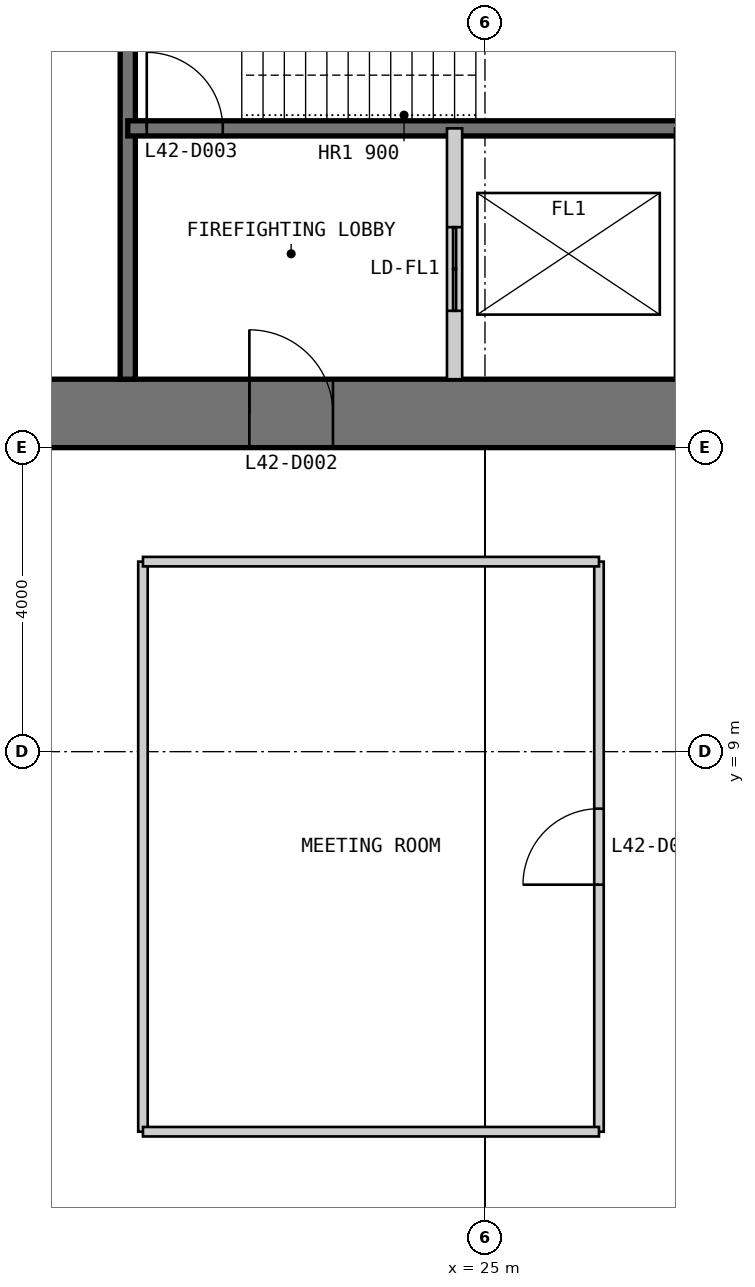
"""IFC4 building model, lengths in metres.
Left out: names, types, materials, properties, quantities, classifications, styles, units other than length and angle.
Written with IfcOpenShell. Run it as: python <this file> out.ifc"""

import sys

from ifc_helpers import new_model, si_unit, direction, frame, frame_2d, origin, place, context, subcontext, project, spatial, polyline, rectangle, outline, extrude, element, fill, save


model = new_model("IFC4")
c1 = context("Model", 3, precision=1e-05, world=origin(), true_north=direction((0.0, 1.0)))
c2 = subcontext(c1, "Body", "Model", "MODEL_VIEW")
j1 = project(units=[si_unit("LENGTHUNIT", "METRE"), si_unit("PLANEANGLEUNIT", "RADIAN")], contexts=[c1])
p1 = place(None, origin())
s1 = spatial("IfcSite", under=j1, at=p1, CompositionType="ELEMENT")
p2 = place(p1, origin())
s2 = spatial("IfcBuilding", under=s1, at=p2, CompositionType="ELEMENT")
p3 = place(p2, frame((0.0, 0.0, 181.8)))
s3 = spatial("IfcBuildingStorey", under=s2, at=p3, CompositionType="ELEMENT", Elevation=181.8)
p4 = place(p3, frame((13.0, 13.45, 0.0), z_axis=(0.0, 0.0, 1.0), x_axis=(1.0, 0.0, 0.0)))
e1 = element("IfcWall", 1, at=p4, inside=s3, PredefinedType="SHEAR", context=c2, shape_type="SweptSolid", body=[
    extrude(outline(polyline([(0.0, -0.45), (24.0, -0.45), (23.1, 0.45), (0.9, 0.45), (0.0, -0.45)])), origin(), (0.0, 0.0, 1.0), 4.0),
])
p5 = place(p4, frame((4.9, 0.0, 0.0)))
e2 = element("IfcOpeningElement", 2, at=p5, cuts=e1, PredefinedType="OPENING", context=c2, shape_type="SweptSolid", body=[
    extrude(rectangle(XDim=1.0, YDim=2.2, at=frame_2d((0.5, 1.1))), frame((0.0, 0.46, 0.0), z_axis=(0.0, -1.0, 0.0), x_axis=(1.0, 0.0, 0.0)), (0.0, 0.0, 1.0), 0.92),
])
p6 = place(p4, frame((8.9, 0.0, 0.0)))
e3 = element("IfcOpeningElement", 3, at=p6, cuts=e1, PredefinedType="OPENING", context=c2, shape_type="SweptSolid", body=[
    extrude(rectangle(XDim=1.1, YDim=2.2, at=frame_2d((0.55, 1.1))), frame((0.0, 0.46, 0.0), z_axis=(0.0, -1.0, 0.0), x_axis=(1.0, 0.0, 0.0)), (0.0, 0.0, 1.0), 0.92),
])
p7 = place(p4, frame((15.05, 0.0, 0.0)))
e4 = element("IfcOpeningElement", 4, at=p7, cuts=e1, PredefinedType="OPENING", context=c2, shape_type="SweptSolid", body=[
    extrude(rectangle(XDim=0.9, YDim=2.2, at=frame_2d((0.45, 1.1))), frame((0.0, 0.46, 0.0), z_axis=(0.0, -1.0, 0.0), x_axis=(1.0, 0.0, 0.0)), (0.0, 0.0, 1.0), 0.92),
])
p8 = place(p4, frame((17.9, 0.0, 0.0)))
e5 = element("IfcOpeningElement", 5, at=p8, cuts=e1, PredefinedType="OPENING", context=c2, shape_type="SweptSolid", body=[
    extrude(rectangle(XDim=1.0, YDim=2.2, at=frame_2d((0.5, 1.1))), frame((0.0, 0.46, 0.0), z_axis=(0.0, -1.0, 0.0), x_axis=(1.0, 0.0, 0.0)), (0.0, 0.0, 1.0), 0.92),
])
p9 = place(p4, frame((21.4, 0.0, 0.0)))
e6 = element("IfcOpeningElement", 6, at=p9, cuts=e1, PredefinedType="OPENING", context=c2, shape_type="SweptSolid", body=[
    extrude(rectangle(XDim=1.0, YDim=2.2, at=frame_2d((0.5, 1.1))), frame((0.0, 0.46, 0.0), z_axis=(0.0, -1.0, 0.0), x_axis=(1.0, 0.0, 0.0)), (0.0, 0.0, 1.0), 0.92),
])
p10 = place(p3, frame((20.3, 13.9, 0.0), z_axis=(0.0, 0.0, 1.0), x_axis=(0.0, 1.0, 0.0)))
e7 = element("IfcWall", 7, at=p10, inside=s3, PredefinedType="SOLIDWALL", context=c2, shape_type="SweptSolid", body=[
    extrude(rectangle(XDim=16.1, YDim=0.2, at=frame_2d((8.05, 0.0))), origin(), (0.0, 0.0, 1.0), 3.8),
])
p11 = place(p10, frame((6.65, 0.0, 0.0)))
e8 = element("IfcOpeningElement", 8, at=p11, cuts=e7, PredefinedType="OPENING", context=c2, shape_type="SweptSolid", body=[
    extrude(rectangle(XDim=0.9, YDim=2.2, at=frame_2d((0.45, 1.1))), frame((0.0, 0.11, 0.0), z_axis=(0.0, -1.0, 0.0), x_axis=(1.0, 0.0, 0.0)), (0.0, 0.0, 1.0), 0.22),
])
p12 = place(p10, frame((9.35, 0.0, 0.0)))
e9 = element("IfcOpeningElement", 9, at=p12, cuts=e7, PredefinedType="OPENING", context=c2, shape_type="SweptSolid", body=[
    extrude(rectangle(XDim=0.9, YDim=2.2, at=frame_2d((0.45, 1.1))), frame((0.0, 0.11, 0.0), z_axis=(0.0, -1.0, 0.0), x_axis=(1.0, 0.0, 0.0)), (0.0, 0.0, 1.0), 0.22),
])
p13 = place(p10, frame((13.35, 0.0, 0.0)))
e10 = element("IfcOpeningElement", 10, at=p13, cuts=e7, PredefinedType="OPENING", context=c2, shape_type="SweptSolid", body=[
    extrude(rectangle(XDim=0.9, YDim=2.2, at=frame_2d((0.45, 1.1))), frame((0.0, 0.11, 0.0), z_axis=(0.0, -1.0, 0.0), x_axis=(1.0, 0.0, 0.0)), (0.0, 0.0, 1.0), 0.22),
])
p14 = place(p3, frame((20.3, 17.2, 0.0), z_axis=(0.0, 0.0, 1.0), x_axis=(1.0, 0.0, 0.0)))
e11 = element("IfcWall", 11, at=p14, inside=s3, PredefinedType="SOLIDWALL", context=c2, shape_type="SweptSolid", body=[
    extrude(rectangle(XDim=9.4, YDim=0.2, at=frame_2d((4.7, 0.0))), origin(), (0.0, 0.0, 1.0), 3.8),
])
p15 = place(p14, frame((0.25, 0.0, 0.0)))
e12 = element("IfcOpeningElement", 12, at=p15, cuts=e11, PredefinedType="OPENING", context=c2, shape_type="SweptSolid", body=[
    extrude(rectangle(XDim=1.0, YDim=2.2, at=frame_2d((0.5, 1.1))), frame((0.0, 0.11, 0.0), z_axis=(0.0, -1.0, 0.0), x_axis=(1.0, 0.0, 0.0)), (0.0, 0.0, 1.0), 0.22),
])
p16 = place(p3, frame((24.6, 13.9, 0.0), z_axis=(0.0, 0.0, 1.0), x_axis=(0.0, 1.0, 0.0)))
e13 = element("IfcWall", 13, at=p16, inside=s3, PredefinedType="PARTITIONING", context=c2, shape_type="SweptSolid", body=[
    extrude(rectangle(XDim=3.3, YDim=0.2, at=frame_2d((1.65, 0.0))), origin(), (0.0, 0.0, 1.0), 3.8),
])
p17 = place(p16, frame((0.9, 0.0, 0.0)))
e14 = element("IfcOpeningElement", 14, at=p17, cuts=e13, PredefinedType="OPENING", context=c2, shape_type="SweptSolid", body=[
    extrude(rectangle(XDim=1.1, YDim=2.2, at=frame_2d((0.55, 1.1))), frame((0.0, 0.11, 0.0), z_axis=(0.0, -1.0, 0.0), x_axis=(1.0, 0.0, 0.0)), (0.0, 0.0, 1.0), 0.22),
])
p18 = place(p3, frame((20.5, 4.0, 0.0), z_axis=(0.0, 0.0, 1.0), x_axis=(0.0, 1.0, 0.0)))
e15 = element("IfcWall", 15, at=p18, inside=s3, PredefinedType="PARTITIONING", context=c2, shape_type="SweptSolid", body=[
    extrude(rectangle(XDim=7.5, YDim=0.125, at=frame_2d((3.75, 0.0))), origin(), (0.0, 0.0, 1.0), 3.85),
])
p19 = place(p3, frame((26.5, 4.0, 0.0), z_axis=(0.0, 0.0, 1.0), x_axis=(0.0, 1.0, 0.0)))
e16 = element("IfcWall", 16, at=p19, inside=s3, PredefinedType="PARTITIONING", context=c2, shape_type="SweptSolid", body=[
    extrude(rectangle(XDim=7.5, YDim=0.125, at=frame_2d((3.75, 0.0))), origin(), (0.0, 0.0, 1.0), 3.85),
])
p20 = place(p19, frame((3.25, 0.0, 0.0)))
e17 = element("IfcOpeningElement", 17, at=p20, cuts=e16, PredefinedType="OPENING", context=c2, shape_type="SweptSolid", body=[
    extrude(rectangle(XDim=1.0, YDim=2.2, at=frame_2d((0.5, 1.1))), frame((0.0, 0.073, 0.0), z_axis=(0.0, -1.0, 0.0), x_axis=(1.0, 0.0, 0.0)), (0.0, 0.0, 1.0), 0.145),
])
for number, where, z_axis, x_axis in (
    (18, (20.5, 4.0, 0.0), (0.0, 0.0, 1.0), (1.0, 0.0, 0.0)),
    (19, (20.5, 11.5, 0.0), (0.0, 0.0, 1.0), (1.0, 0.0, 0.0)),
):
    element("IfcWall", number, at=place(p3, frame(where, z_axis=z_axis, x_axis=x_axis)), inside=s3, PredefinedType="PARTITIONING", context=c2, shape_type="SweptSolid", body=[
        extrude(rectangle(XDim=6.0, YDim=0.125, at=frame_2d((3.0, 0.0))), origin(), (0.0, 0.0, 1.0), 3.85),
    ])
p21 = place(p6, origin())
e20 = element("IfcDoor", 20, at=p21, inside=s3, OperationType="SINGLE_SWING_LEFT", PredefinedType="DOOR", context=c2, shape_type="SweptSolid", body=[
    extrude(rectangle(XDim=1.1, YDim=2.2, at=frame_2d((0.55, 1.1))), frame((0.0, 0.025, 0.0), z_axis=(0.0, -1.0, 0.0), x_axis=(1.0, 0.0, 0.0)), (0.0, 0.0, 1.0), 0.05),
    extrude(outline(polyline([(0.0, 0.0), (0.04, 0.0), (0.04, 2.16), (1.06, 2.16), (1.06, 0.0), (1.1, 0.0), (1.1, 2.2), (0.0, 2.2), (0.0, 0.0)])), frame((0.0, 0.3, 0.0), z_axis=(0.0, -1.0, 0.0), x_axis=(1.0, 0.0, 0.0)), (0.0, 0.0, 1.0), 0.6),
])
fill(e3, e20)
p22 = place(p15, origin())
e21 = element("IfcDoor", 21, at=p22, inside=s3, OperationType="SINGLE_SWING_LEFT", PredefinedType="DOOR", context=c2, shape_type="SweptSolid", body=[
    extrude(rectangle(XDim=1.0, YDim=2.2, at=frame_2d((0.5, 1.1))), frame((0.0, 0.025, 0.0), z_axis=(0.0, -1.0, 0.0), x_axis=(1.0, 0.0, 0.0)), (0.0, 0.0, 1.0), 0.05),
])
fill(e12, e21)
p23 = place(p20, origin())
e22 = element("IfcDoor", 22, at=p23, inside=s3, OperationType="SINGLE_SWING_LEFT", PredefinedType="DOOR", context=c2, shape_type="SweptSolid", body=[
    extrude(rectangle(XDim=1.0, YDim=2.2, at=frame_2d((0.5, 1.1))), frame((0.0, 0.025, 0.0), z_axis=(0.0, -1.0, 0.0), x_axis=(1.0, 0.0, 0.0)), (0.0, 0.0, 1.0), 0.05),
])
fill(e17, e22)
p24 = place(p17, origin())
e23 = element("IfcDoor", 23, at=p24, inside=s3, OperationType="DOUBLE_DOOR_SLIDING", PredefinedType="DOOR", context=c2, shape_type="SweptSolid", body=[
    extrude(rectangle(XDim=1.1, YDim=2.2, at=frame_2d((0.55, 1.1))), frame((0.0, 0.025, 0.0), z_axis=(0.0, -1.0, 0.0), x_axis=(1.0, 0.0, 0.0)), (0.0, 0.0, 1.0), 0.05),
])
fill(e14, e23)
save(model, sys.argv[1])
